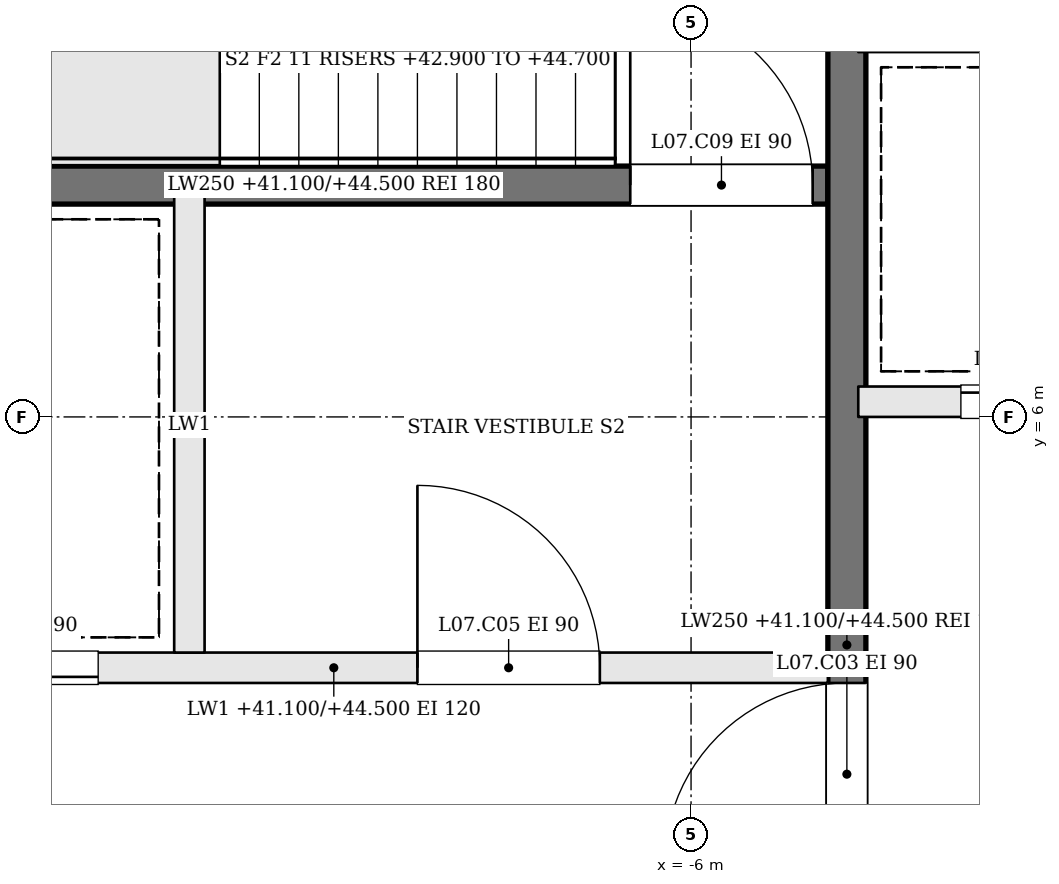
"""IFC4 building model, lengths in metres.
Left out: names, types, materials, properties, quantities, classifications, styles, units other than length and angle.
Written with IfcOpenShell. Run it as: python <this file> out.ifc"""

import sys

from ifc_helpers import new_model, si_unit, direction, frame, frame_2d, origin, place, context, subcontext, project, spatial, rectangle, extrude, element, fill, save


model = new_model("IFC4")
c1 = context("Model", 3, precision=1e-05, world=origin(), true_north=direction((0.0, 1.0)))
c2 = subcontext(c1, "Body", "Model", "MODEL_VIEW")
j1 = project(units=[si_unit("LENGTHUNIT", "METRE"), si_unit("PLANEANGLEUNIT", "RADIAN")], contexts=[c1])
p1 = place(None, origin())
s1 = spatial("IfcSite", under=j1, at=p1, CompositionType="ELEMENT")
p2 = place(p1, origin())
s2 = spatial("IfcBuilding", under=s1, at=p2, CompositionType="ELEMENT")
p3 = place(p2, frame((0.0, 0.0, 41.1)))
s3 = spatial("IfcBuildingStorey", under=s2, at=p3, CompositionType="ELEMENT", Elevation=41.1)
p4 = place(p3, frame((-11.6, 4.35, 0.0), z_axis=(0.0, 0.0, 1.0), x_axis=(1.0, 0.0, 0.0)))
e1 = element("IfcWall", 1, at=p4, inside=s3, PredefinedType="SOLIDWALL", context=c2, shape_type="SweptSolid", body=[
    extrude(rectangle(XDim=6.5, YDim=0.2, at=frame_2d((3.25, 0.0))), origin(), (0.0, 0.0, 1.0), 3.4),
])
p5 = place(p4, frame((3.8, 0.0, 0.0)))
e2 = element("IfcOpeningElement", 2, at=p5, cuts=e1, PredefinedType="OPENING", context=c2, shape_type="SweptSolid", body=[
    extrude(rectangle(XDim=1.2, YDim=2.1, at=frame_2d((0.6, 1.05))), frame((0.0, 0.11, 0.0), z_axis=(0.0, -1.0, 0.0), x_axis=(1.0, 0.0, 0.0)), (0.0, 0.0, 1.0), 0.22),
])
p6 = place(p4, frame((0.5, 0.0, 0.0)))
e3 = element("IfcOpeningElement", 3, at=p6, cuts=e1, PredefinedType="OPENING", context=c2, shape_type="SweptSolid", body=[
    extrude(rectangle(XDim=1.2, YDim=2.1, at=frame_2d((0.6, 1.05))), frame((0.0, 0.11, 0.0), z_axis=(0.0, -1.0, 0.0), x_axis=(1.0, 0.0, 0.0)), (0.0, 0.0, 1.0), 0.22),
])
p7 = place(p3, frame((-11.6, 7.525, 0.0), z_axis=(0.0, 0.0, 1.0), x_axis=(1.0, 0.0, 0.0)))
e4 = element("IfcWall", 4, at=p7, inside=s3, PredefinedType="SOLIDWALL", context=c2, shape_type="SweptSolid", body=[
    extrude(rectangle(XDim=6.5, YDim=0.25, at=frame_2d((3.25, 0.0))), origin(), (0.0, 0.0, 1.0), 3.4),
])
p8 = place(p7, frame((5.2, 0.0, 0.0)))
e5 = element("IfcOpeningElement", 5, at=p8, cuts=e4, PredefinedType="OPENING", context=c2, shape_type="SweptSolid", body=[
    extrude(rectangle(XDim=1.2, YDim=2.1, at=frame_2d((0.6, 1.05))), frame((0.0, 0.135, 0.0), z_axis=(0.0, -1.0, 0.0), x_axis=(1.0, 0.0, 0.0)), (0.0, 0.0, 1.0), 0.27),
])
p9 = place(p3, frame((-9.3, 4.45, 0.0), z_axis=(0.0, 0.0, 1.0), x_axis=(0.0, 1.0, 0.0)))
e6 = element("IfcWall", 6, at=p9, inside=s3, PredefinedType="SOLIDWALL", context=c2, shape_type="SweptSolid", body=[
    extrude(rectangle(XDim=3.0, YDim=0.2, at=frame_2d((1.5, 0.0))), origin(), (0.0, 0.0, 1.0), 3.4),
])
p10 = place(p3, frame((-4.975, -1.6, 0.0), z_axis=(0.0, 0.0, 1.0), x_axis=(0.0, 1.0, 0.0)))
e7 = element("IfcWall", 7, at=p10, inside=s3, PredefinedType="SOLIDWALL", context=c2, shape_type="SweptSolid", body=[
    extrude(rectangle(XDim=12.2, YDim=0.25, at=frame_2d((6.1, 0.0))), origin(), (0.0, 0.0, 1.0), 3.4),
])
p11 = place(p10, frame((4.65, 0.0, 0.0)))
e8 = element("IfcOpeningElement", 8, at=p11, cuts=e7, PredefinedType="OPENING", context=c2, shape_type="SweptSolid", body=[
    extrude(rectangle(XDim=1.2, YDim=2.1, at=frame_2d((0.6, 1.05))), frame((0.0, 0.135, 0.0), z_axis=(0.0, -1.0, 0.0), x_axis=(1.0, 0.0, 0.0)), (0.0, 0.0, 1.0), 0.27),
])
p12 = place(p3, frame((-4.9, 6.1, 0.0), z_axis=(0.0, 0.0, 1.0), x_axis=(1.0, 0.0, 0.0)))
e9 = element("IfcWall", 9, at=p12, inside=s3, PredefinedType="SOLIDWALL", context=c2, shape_type="SweptSolid", body=[
    extrude(rectangle(XDim=9.8, YDim=0.2, at=frame_2d((4.9, 0.0))), origin(), (0.0, 0.0, 1.0), 3.4),
])
p13 = place(p12, frame((0.675, 0.0, 0.0)))
e10 = element("IfcOpeningElement", 10, at=p13, cuts=e9, PredefinedType="OPENING", context=c2, shape_type="SweptSolid", body=[
    extrude(rectangle(XDim=1.1, YDim=2.1, at=frame_2d((0.55, 1.05))), frame((0.0, 0.11, 0.0), z_axis=(0.0, -1.0, 0.0), x_axis=(1.0, 0.0, 0.0)), (0.0, 0.0, 1.0), 0.22),
])
p14 = place(p12, frame((3.125, 0.0, 0.0)))
e11 = element("IfcOpeningElement", 11, at=p14, cuts=e9, PredefinedType="OPENING", context=c2, shape_type="SweptSolid", body=[
    extrude(rectangle(XDim=1.1, YDim=2.1, at=frame_2d((0.55, 1.05))), frame((0.0, 0.11, 0.0), z_axis=(0.0, -1.0, 0.0), x_axis=(1.0, 0.0, 0.0)), (0.0, 0.0, 1.0), 0.22),
])
p15 = place(p12, frame((5.575, 0.0, 0.0)))
e12 = element("IfcOpeningElement", 12, at=p15, cuts=e9, PredefinedType="OPENING", context=c2, shape_type="SweptSolid", body=[
    extrude(rectangle(XDim=1.1, YDim=2.1, at=frame_2d((0.55, 1.05))), frame((0.0, 0.11, 0.0), z_axis=(0.0, -1.0, 0.0), x_axis=(1.0, 0.0, 0.0)), (0.0, 0.0, 1.0), 0.22),
])
p16 = place(p12, frame((8.025, 0.0, 0.0)))
e13 = element("IfcOpeningElement", 13, at=p16, cuts=e9, PredefinedType="OPENING", context=c2, shape_type="SweptSolid", body=[
    extrude(rectangle(XDim=1.1, YDim=2.1, at=frame_2d((0.55, 1.05))), frame((0.0, 0.11, 0.0), z_axis=(0.0, -1.0, 0.0), x_axis=(1.0, 0.0, 0.0)), (0.0, 0.0, 1.0), 0.22),
])
p17 = place(p11, origin())
e14 = element("IfcDoor", 14, at=p17, inside=s3, OperationType="SINGLE_SWING_LEFT", PredefinedType="DOOR", context=c2, shape_type="SweptSolid", body=[
    extrude(rectangle(XDim=1.2, YDim=2.1, at=frame_2d((0.6, 1.05))), frame((0.0, 0.025, 0.0), z_axis=(0.0, -1.0, 0.0), x_axis=(1.0, 0.0, 0.0)), (0.0, 0.0, 1.0), 0.05),
])
fill(e8, e14)
p18 = place(p5, origin())
e15 = element("IfcDoor", 15, at=p18, inside=s3, OperationType="SINGLE_SWING_LEFT", PredefinedType="DOOR", context=c2, shape_type="SweptSolid", body=[
    extrude(rectangle(XDim=1.2, YDim=2.1, at=frame_2d((0.6, 1.05))), frame((0.0, 0.025, 0.0), z_axis=(0.0, -1.0, 0.0), x_axis=(1.0, 0.0, 0.0)), (0.0, 0.0, 1.0), 0.05),
])
fill(e2, e15)
p19 = place(p8, origin())
e16 = element("IfcDoor", 16, at=p19, inside=s3, OperationType="SINGLE_SWING_LEFT", PredefinedType="DOOR", context=c2, shape_type="SweptSolid", body=[
    extrude(rectangle(XDim=1.2, YDim=2.1, at=frame_2d((0.6, 1.05))), frame((0.0, 0.025, 0.0), z_axis=(0.0, -1.0, 0.0), x_axis=(1.0, 0.0, 0.0)), (0.0, 0.0, 1.0), 0.05),
])
fill(e5, e16)
p20 = place(p6, origin())
e17 = element("IfcDoor", 17, at=p20, inside=s3, OperationType="SLIDING_TO_RIGHT", PredefinedType="DOOR", context=c2, shape_type="SweptSolid", body=[
    extrude(rectangle(XDim=1.2, YDim=2.1, at=frame_2d((0.6, 1.05))), frame((0.0, 0.025, 0.0), z_axis=(0.0, -1.0, 0.0), x_axis=(1.0, 0.0, 0.0)), (0.0, 0.0, 1.0), 0.05),
])
fill(e3, e17)
p21 = place(p13, origin())
e18 = element("IfcDoor", 18, at=p21, inside=s3, OperationType="SLIDING_TO_RIGHT", PredefinedType="DOOR", context=c2, shape_type="SweptSolid", body=[
    extrude(rectangle(XDim=1.1, YDim=2.1, at=frame_2d((0.55, 1.05))), frame((0.0, 0.025, 0.0), z_axis=(0.0, -1.0, 0.0), x_axis=(1.0, 0.0, 0.0)), (0.0, 0.0, 1.0), 0.05),
])
fill(e10, e18)
save(model, sys.argv[1])
